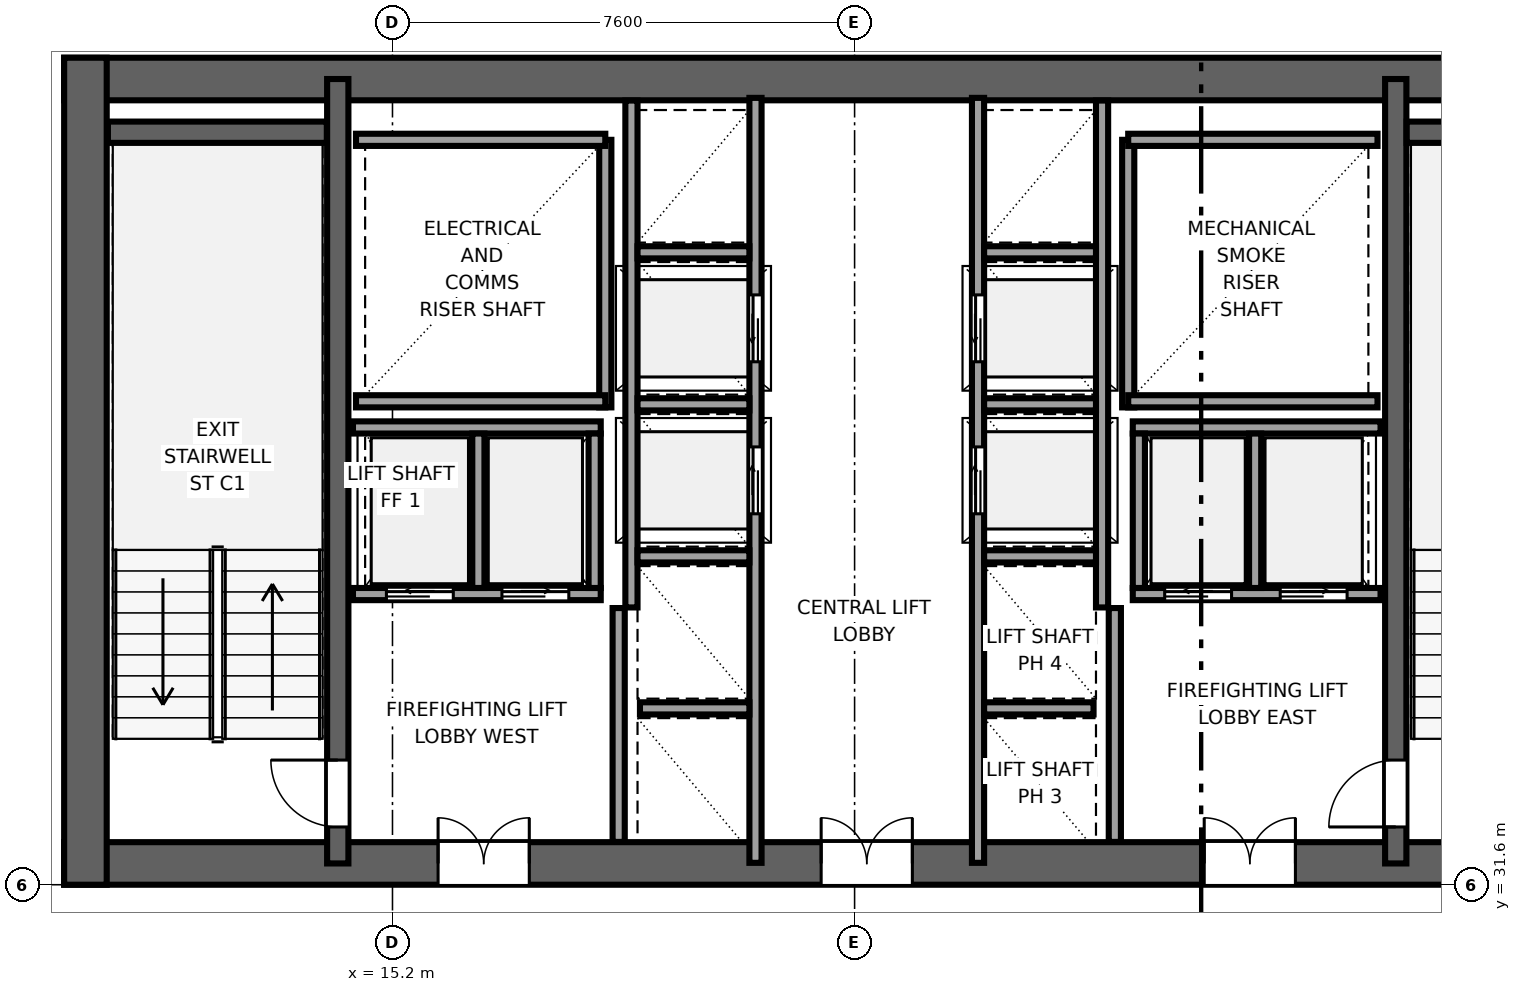
"""IFC4 building model, lengths in metres.
Left out: names, types, materials, properties, quantities, classifications, styles, units other than length and angle.
Written with IfcOpenShell. Run it as: python <this file> out.ifc"""

import sys

from ifc_helpers import new_model, si_unit, direction, frame, frame_2d, origin, place, context, subcontext, project, spatial, rectangle, extrude, source, transform, mapped, element, fill, save


model = new_model("IFC4")
c1 = context("Model", 3, precision=1e-05, world=origin(), true_north=direction((0.0, 1.0)))
c2 = subcontext(c1, "Body", "Model", "MODEL_VIEW")
j1 = project(units=[si_unit("LENGTHUNIT", "METRE"), si_unit("PLANEANGLEUNIT", "RADIAN")], contexts=[c1])
p1 = place(None, origin())
s1 = spatial("IfcSite", under=j1, at=p1, CompositionType="ELEMENT")
p2 = place(p1, origin())
s2 = spatial("IfcBuilding", under=s1, at=p2, CompositionType="ELEMENT")
p3 = place(p2, frame((0.0, 0.0, 118.65)))
s3 = spatial("IfcBuildingStorey", under=s2, at=p3, CompositionType="ELEMENT", Elevation=118.65)
p4 = place(p3, frame((9.8, 31.95, 0.0), z_axis=(0.0, 0.0, 1.0), x_axis=(1.0, 0.0, 0.0)))
e1 = element("IfcWall", 1, at=p4, inside=s3, PredefinedType="SHEAR", context=c2, shape_type="SweptSolid", body=[
    extrude(rectangle(XDim=26.4, YDim=0.7, at=frame_2d((13.2, 0.0))), origin(), (0.0, 0.0, 1.0), 3.55),
])
p5 = place(p4, frame((7.65, 0.0, 0.0), z_axis=(0.0, 0.0, 1.0), x_axis=(-1.0, 0.0, 0.0)))
e2 = element("IfcOpeningElement", 2, at=p5, cuts=e1, PredefinedType="OPENING", context=c2, shape_type="SweptSolid", body=[
    extrude(rectangle(XDim=1.5, YDim=2.04, at=frame_2d((0.75, 1.02))), frame((0.0, 0.36, 0.0), z_axis=(0.0, -1.0, 0.0), x_axis=(1.0, 0.0, 0.0)), (0.0, 0.0, 1.0), 0.72),
])
p6 = place(p4, frame((13.95, 0.0, 0.0), z_axis=(0.0, 0.0, 1.0), x_axis=(-1.0, 0.0, 0.0)))
e3 = element("IfcOpeningElement", 3, at=p6, cuts=e1, PredefinedType="OPENING", context=c2, shape_type="SweptSolid", body=[
    extrude(rectangle(XDim=1.5, YDim=2.04, at=frame_2d((0.75, 1.02))), frame((0.0, 0.36, 0.0), z_axis=(0.0, -1.0, 0.0), x_axis=(1.0, 0.0, 0.0)), (0.0, 0.0, 1.0), 0.72),
])
p7 = place(p4, frame((20.25, 0.0, 0.0), z_axis=(0.0, 0.0, 1.0), x_axis=(-1.0, 0.0, 0.0)))
e4 = element("IfcOpeningElement", 4, at=p7, cuts=e1, PredefinedType="OPENING", context=c2, shape_type="SweptSolid", body=[
    extrude(rectangle(XDim=1.5, YDim=2.04, at=frame_2d((0.75, 1.02))), frame((0.0, 0.36, 0.0), z_axis=(0.0, -1.0, 0.0), x_axis=(1.0, 0.0, 0.0)), (0.0, 0.0, 1.0), 0.72),
])
p8 = place(p3, frame((9.8, 44.85, 0.0), z_axis=(0.0, 0.0, 1.0), x_axis=(1.0, 0.0, 0.0)))
e5 = element("IfcWall", 5, at=p8, inside=s3, PredefinedType="SHEAR", context=c2, shape_type="SweptSolid", body=[
    extrude(rectangle(XDim=26.4, YDim=0.7, at=frame_2d((13.2, 0.0))), origin(), (0.0, 0.0, 1.0), 3.55),
])
p9 = place(p3, frame((10.15, 31.6, 0.0), z_axis=(0.0, 0.0, 1.0), x_axis=(0.0, 1.0, 0.0)))
e6 = element("IfcWall", 6, at=p9, inside=s3, PredefinedType="SHEAR", context=c2, shape_type="SweptSolid", body=[
    extrude(rectangle(XDim=13.6, YDim=0.7, at=frame_2d((6.8, 0.0))), origin(), (0.0, 0.0, 1.0), 3.55),
])
p10 = place(p3, frame((14.3, 31.95, 0.0), z_axis=(0.0, 0.0, 1.0), x_axis=(0.0, 1.0, 0.0)))
e7 = element("IfcWall", 7, at=p10, inside=s3, PredefinedType="SHEAR", context=c2, shape_type="SweptSolid", body=[
    extrude(rectangle(XDim=12.9, YDim=0.35, at=frame_2d((6.45, 0.0))), origin(), (0.0, 0.0, 1.0), 3.55),
])
p11 = place(p10, frame((0.6, 0.0, 0.0)))
e8 = element("IfcOpeningElement", 8, at=p11, cuts=e7, PredefinedType="OPENING", context=c2, shape_type="SweptSolid", body=[
    extrude(rectangle(XDim=1.1, YDim=2.12, at=frame_2d((0.55, 1.06))), frame((0.0, 0.185, 0.0), z_axis=(0.0, -1.0, 0.0), x_axis=(1.0, 0.0, 0.0)), (0.0, 0.0, 1.0), 0.37),
])
p12 = place(p3, frame((31.7, 31.95, 0.0), z_axis=(0.0, 0.0, 1.0), x_axis=(0.0, 1.0, 0.0)))
e9 = element("IfcWall", 9, at=p12, inside=s3, PredefinedType="SHEAR", context=c2, shape_type="SweptSolid", body=[
    extrude(rectangle(XDim=12.9, YDim=0.35, at=frame_2d((6.45, 0.0))), origin(), (0.0, 0.0, 1.0), 3.55),
])
p13 = place(p12, frame((1.7, 0.0, 0.0), z_axis=(0.0, 0.0, 1.0), x_axis=(-1.0, 0.0, 0.0)))
e10 = element("IfcOpeningElement", 10, at=p13, cuts=e9, PredefinedType="OPENING", context=c2, shape_type="SweptSolid", body=[
    extrude(rectangle(XDim=1.1, YDim=2.12, at=frame_2d((0.55, 1.06))), frame((0.0, 0.185, 0.0), z_axis=(0.0, -1.0, 0.0), x_axis=(1.0, 0.0, 0.0)), (0.0, 0.0, 1.0), 0.37),
])
for number, where, z_axis, x_axis in (
    (11, (10.52, 43.975, 0.0), (0.0, 0.0, 1.0), (1.0, 0.0, 0.0)),
    (12, (31.88, 43.975, 0.0), (0.0, 0.0, 1.0), (1.0, 0.0, 0.0)),
):
    element("IfcWall", number, at=place(p3, frame(where, z_axis=z_axis, x_axis=x_axis)), inside=s3, PredefinedType="SHEAR", context=c2, shape_type="SweptSolid", body=[
        extrude(rectangle(XDim=3.6, YDim=0.35, at=frame_2d((1.8, 0.0))), origin(), (0.0, 0.0, 1.0), 3.55),
    ])
p14 = place(p3, frame((18.7, 39.45, 0.0), z_axis=(0.0, 0.0, 1.0), x_axis=(0.0, 1.0, 0.0)))
e13 = element("IfcWall", 13, at=p14, inside=s3, PredefinedType="SOLIDWALL", context=c2, shape_type="SweptSolid", body=[
    extrude(rectangle(XDim=4.4, YDim=0.2, at=frame_2d((2.2, 0.0))), origin(), (0.0, 0.0, 1.0), 3.37),
])
for number, where, z_axis, x_axis in (
    (14, (14.6, 39.55, 0.0), (0.0, 0.0, 1.0), (1.0, 0.0, 0.0)),
    (15, (14.6, 43.85, 0.0), (0.0, 0.0, 1.0), (1.0, 0.0, 0.0)),
):
    element("IfcWall", number, at=place(p3, frame(where, z_axis=z_axis, x_axis=x_axis)), inside=s3, PredefinedType="SOLIDWALL", context=c2, shape_type="SweptSolid", body=[
        extrude(rectangle(XDim=4.1, YDim=0.2, at=frame_2d((2.05, 0.0))), origin(), (0.0, 0.0, 1.0), 3.37),
    ])
p15 = place(p3, frame((27.3, 39.45, 0.0), z_axis=(0.0, 0.0, 1.0), x_axis=(0.0, 1.0, 0.0)))
e16 = element("IfcWall", 16, at=p15, inside=s3, PredefinedType="SOLIDWALL", context=c2, shape_type="SweptSolid", body=[
    extrude(rectangle(XDim=4.4, YDim=0.2, at=frame_2d((2.2, 0.0))), origin(), (0.0, 0.0, 1.0), 3.37),
])
for number, where, z_axis, x_axis in (
    (17, (27.3, 39.55, 0.0), (0.0, 0.0, 1.0), (1.0, 0.0, 0.0)),
    (18, (27.3, 43.85, 0.0), (0.0, 0.0, 1.0), (1.0, 0.0, 0.0)),
):
    element("IfcWall", number, at=place(p3, frame(where, z_axis=z_axis, x_axis=x_axis)), inside=s3, PredefinedType="SOLIDWALL", context=c2, shape_type="SweptSolid", body=[
        extrude(rectangle(XDim=4.1, YDim=0.2, at=frame_2d((2.05, 0.0))), origin(), (0.0, 0.0, 1.0), 3.37),
    ])
for number, where, z_axis, x_axis in (
    (19, (18.92, 32.304, 0.0), (0.0, 0.0, 1.0), (0.0, 1.0, 0.0)),
    (20, (27.08, 32.304, 0.0), (0.0, 0.0, 1.0), (0.0, 1.0, 0.0)),
):
    element("IfcWall", number, at=place(p3, frame(where, z_axis=z_axis, x_axis=x_axis)), inside=s3, PredefinedType="SOLIDWALL", context=c2, shape_type="SweptSolid", body=[
        extrude(rectangle(XDim=3.846, YDim=0.2, at=frame_2d((1.923, 0.0))), origin(), (0.0, 0.0, 1.0), 3.37),
    ])
p16 = place(p3, frame((21.17, 31.96, 0.0), z_axis=(0.0, 0.0, 1.0), x_axis=(0.0, 1.0, 0.0)))
e21 = element("IfcWall", 21, at=p16, inside=s3, PredefinedType="SOLIDWALL", context=c2, shape_type="SweptSolid", body=[
    extrude(rectangle(XDim=12.58, YDim=0.2, at=frame_2d((6.29, 0.0))), origin(), (0.0, 0.0, 1.0), 3.37),
])
p17 = place(p16, frame((5.74, 0.0, 0.0)))
e22 = element("IfcOpeningElement", 22, at=p17, cuts=e21, PredefinedType="OPENING", context=c2, shape_type="SweptSolid", body=[
    extrude(rectangle(XDim=1.1, YDim=2.12, at=frame_2d((0.55, 1.06))), frame((0.0, 0.11, 0.0), z_axis=(0.0, -1.0, 0.0), x_axis=(1.0, 0.0, 0.0)), (0.0, 0.0, 1.0), 0.22),
])
p18 = place(p16, frame((8.24, 0.0, 0.0)))
e23 = element("IfcOpeningElement", 23, at=p18, cuts=e21, PredefinedType="OPENING", context=c2, shape_type="SweptSolid", body=[
    extrude(rectangle(XDim=1.1, YDim=2.12, at=frame_2d((0.55, 1.06))), frame((0.0, 0.11, 0.0), z_axis=(0.0, -1.0, 0.0), x_axis=(1.0, 0.0, 0.0)), (0.0, 0.0, 1.0), 0.22),
])
p19 = place(p3, frame((19.13, 36.16, 0.0), z_axis=(0.0, 0.0, 1.0), x_axis=(0.0, 1.0, 0.0)))
e24 = element("IfcWall", 24, at=p19, inside=s3, PredefinedType="SOLIDWALL", context=c2, shape_type="SweptSolid", body=[
    extrude(rectangle(XDim=8.336, YDim=0.2, at=frame_2d((4.168, 0.0))), origin(), (0.0, 0.0, 1.0), 3.37),
])
p20 = place(p3, frame((19.27, 34.5, 0.0), z_axis=(0.0, 0.0, 1.0), x_axis=(1.0, 0.0, 0.0)))
e25 = element("IfcWall", 25, at=p20, inside=s3, PredefinedType="SOLIDWALL", context=c2, shape_type="SweptSolid", body=[
    extrude(rectangle(XDim=1.8, YDim=0.2, at=frame_2d((0.9, 0.0))), origin(), (0.0, 0.0, 1.0), 3.37),
])
for number, where, z_axis, x_axis in (
    (26, (19.23, 37.0, 0.0), (0.0, 0.0, 1.0), (1.0, 0.0, 0.0)),
    (27, (19.23, 39.5, 0.0), (0.0, 0.0, 1.0), (1.0, 0.0, 0.0)),
    (28, (19.23, 42.0, 0.0), (0.0, 0.0, 1.0), (1.0, 0.0, 0.0)),
):
    element("IfcWall", number, at=place(p3, frame(where, z_axis=z_axis, x_axis=x_axis)), inside=s3, PredefinedType="SOLIDWALL", context=c2, shape_type="SweptSolid", body=[
        extrude(rectangle(XDim=1.84, YDim=0.2, at=frame_2d((0.92, 0.0))), origin(), (0.0, 0.0, 1.0), 3.37),
    ])
p21 = place(p3, frame((27.375, 36.38, 0.0), z_axis=(0.0, 0.0, 1.0), x_axis=(1.0, 0.0, 0.0)))
e29 = element("IfcWall", 29, at=p21, inside=s3, PredefinedType="SOLIDWALL", context=c2, shape_type="SweptSolid", body=[
    extrude(rectangle(XDim=4.075, YDim=0.2, at=frame_2d((2.038, 0.0))), origin(), (0.0, 0.0, 1.0), 3.37),
])
p22 = place(p21, frame((0.525, 0.0, 0.0)))
e30 = element("IfcOpeningElement", 30, at=p22, cuts=e29, PredefinedType="OPENING", context=c2, shape_type="SweptSolid", body=[
    extrude(rectangle(XDim=1.1, YDim=2.12, at=frame_2d((0.55, 1.06))), frame((0.0, 0.11, 0.0), z_axis=(0.0, -1.0, 0.0), x_axis=(1.0, 0.0, 0.0)), (0.0, 0.0, 1.0), 0.22),
])
p23 = place(p21, frame((2.425, 0.0, 0.0)))
e31 = element("IfcOpeningElement", 31, at=p23, cuts=e29, PredefinedType="OPENING", context=c2, shape_type="SweptSolid", body=[
    extrude(rectangle(XDim=1.1, YDim=2.12, at=frame_2d((0.55, 1.06))), frame((0.0, 0.11, 0.0), z_axis=(0.0, -1.0, 0.0), x_axis=(1.0, 0.0, 0.0)), (0.0, 0.0, 1.0), 0.22),
])
p24 = place(p3, frame((27.375, 39.12, 0.0), z_axis=(0.0, 0.0, 1.0), x_axis=(1.0, 0.0, 0.0)))
e32 = element("IfcWall", 32, at=p24, inside=s3, PredefinedType="SOLIDWALL", context=c2, shape_type="SweptSolid", body=[
    extrude(rectangle(XDim=4.075, YDim=0.2, at=frame_2d((2.038, 0.0))), origin(), (0.0, 0.0, 1.0), 3.37),
])
for number, where, z_axis, x_axis in (
    (33, (27.475, 36.48, 0.0), (0.0, 0.0, 1.0), (0.0, 1.0, 0.0)),
    (34, (29.387, 36.48, 0.0), (0.0, 0.0, 1.0), (0.0, 1.0, 0.0)),
):
    element("IfcWall", number, at=place(p3, frame(where, z_axis=z_axis, x_axis=x_axis)), inside=s3, PredefinedType="SOLIDWALL", context=c2, shape_type="SweptSolid", body=[
        extrude(rectangle(XDim=2.54, YDim=0.2, at=frame_2d((1.27, 0.0))), origin(), (0.0, 0.0, 1.0), 3.37),
    ])
p25 = place(p3, frame((14.55, 36.38, 0.0), z_axis=(0.0, 0.0, 1.0), x_axis=(1.0, 0.0, 0.0)))
e35 = element("IfcWall", 35, at=p25, inside=s3, PredefinedType="SOLIDWALL", context=c2, shape_type="SweptSolid", body=[
    extrude(rectangle(XDim=4.075, YDim=0.2, at=frame_2d((2.038, 0.0))), origin(), (0.0, 0.0, 1.0), 3.37),
])
p26 = place(p25, frame((0.55, 0.0, 0.0)))
e36 = element("IfcOpeningElement", 36, at=p26, cuts=e35, PredefinedType="OPENING", context=c2, shape_type="SweptSolid", body=[
    extrude(rectangle(XDim=1.1, YDim=2.12, at=frame_2d((0.55, 1.06))), frame((0.0, 0.11, 0.0), z_axis=(0.0, -1.0, 0.0), x_axis=(1.0, 0.0, 0.0)), (0.0, 0.0, 1.0), 0.22),
])
p27 = place(p25, frame((2.45, 0.0, 0.0)))
e37 = element("IfcOpeningElement", 37, at=p27, cuts=e35, PredefinedType="OPENING", context=c2, shape_type="SweptSolid", body=[
    extrude(rectangle(XDim=1.1, YDim=2.12, at=frame_2d((0.55, 1.06))), frame((0.0, 0.11, 0.0), z_axis=(0.0, -1.0, 0.0), x_axis=(1.0, 0.0, 0.0)), (0.0, 0.0, 1.0), 0.22),
])
p28 = place(p3, frame((14.55, 39.12, 0.0), z_axis=(0.0, 0.0, 1.0), x_axis=(1.0, 0.0, 0.0)))
e38 = element("IfcWall", 38, at=p28, inside=s3, PredefinedType="SOLIDWALL", context=c2, shape_type="SweptSolid", body=[
    extrude(rectangle(XDim=4.075, YDim=0.2, at=frame_2d((2.038, 0.0))), origin(), (0.0, 0.0, 1.0), 3.37),
])
for number, where, z_axis, x_axis in (
    (39, (18.525, 36.48, 0.0), (0.0, 0.0, 1.0), (0.0, 1.0, 0.0)),
    (40, (16.613, 36.48, 0.0), (0.0, 0.0, 1.0), (0.0, 1.0, 0.0)),
):
    element("IfcWall", number, at=place(p3, frame(where, z_axis=z_axis, x_axis=x_axis)), inside=s3, PredefinedType="SOLIDWALL", context=c2, shape_type="SweptSolid", body=[
        extrude(rectangle(XDim=2.54, YDim=0.2, at=frame_2d((1.27, 0.0))), origin(), (0.0, 0.0, 1.0), 3.37),
    ])
p29 = place(p3, frame((24.83, 31.96, 0.0), z_axis=(0.0, 0.0, 1.0), x_axis=(0.0, 1.0, 0.0)))
e41 = element("IfcWall", 41, at=p29, inside=s3, PredefinedType="SOLIDWALL", context=c2, shape_type="SweptSolid", body=[
    extrude(rectangle(XDim=12.58, YDim=0.2, at=frame_2d((6.29, 0.0))), origin(), (0.0, 0.0, 1.0), 3.37),
])
p30 = place(p29, frame((5.74, 0.0, 0.0)))
e42 = element("IfcOpeningElement", 42, at=p30, cuts=e41, PredefinedType="OPENING", context=c2, shape_type="SweptSolid", body=[
    extrude(rectangle(XDim=1.1, YDim=2.12, at=frame_2d((0.55, 1.06))), frame((0.0, 0.11, 0.0), z_axis=(0.0, -1.0, 0.0), x_axis=(1.0, 0.0, 0.0)), (0.0, 0.0, 1.0), 0.22),
])
p31 = place(p29, frame((8.24, 0.0, 0.0)))
e43 = element("IfcOpeningElement", 43, at=p31, cuts=e41, PredefinedType="OPENING", context=c2, shape_type="SweptSolid", body=[
    extrude(rectangle(XDim=1.1, YDim=2.12, at=frame_2d((0.55, 1.06))), frame((0.0, 0.11, 0.0), z_axis=(0.0, -1.0, 0.0), x_axis=(1.0, 0.0, 0.0)), (0.0, 0.0, 1.0), 0.22),
])
p32 = place(p3, frame((26.87, 36.16, 0.0), z_axis=(0.0, 0.0, 1.0), x_axis=(0.0, 1.0, 0.0)))
e44 = element("IfcWall", 44, at=p32, inside=s3, PredefinedType="SOLIDWALL", context=c2, shape_type="SweptSolid", body=[
    extrude(rectangle(XDim=8.336, YDim=0.2, at=frame_2d((4.168, 0.0))), origin(), (0.0, 0.0, 1.0), 3.37),
])
p33 = place(p3, frame((24.93, 34.5, 0.0), z_axis=(0.0, 0.0, 1.0), x_axis=(1.0, 0.0, 0.0)))
e45 = element("IfcWall", 45, at=p33, inside=s3, PredefinedType="SOLIDWALL", context=c2, shape_type="SweptSolid", body=[
    extrude(rectangle(XDim=1.8, YDim=0.2, at=frame_2d((0.9, 0.0))), origin(), (0.0, 0.0, 1.0), 3.37),
])
for number, where, z_axis, x_axis in (
    (46, (24.93, 37.0, 0.0), (0.0, 0.0, 1.0), (1.0, 0.0, 0.0)),
    (47, (24.93, 39.5, 0.0), (0.0, 0.0, 1.0), (1.0, 0.0, 0.0)),
    (48, (24.93, 42.0, 0.0), (0.0, 0.0, 1.0), (1.0, 0.0, 0.0)),
):
    element("IfcWall", number, at=place(p3, frame(where, z_axis=z_axis, x_axis=x_axis)), inside=s3, PredefinedType="SOLIDWALL", context=c2, shape_type="SweptSolid", body=[
        extrude(rectangle(XDim=1.84, YDim=0.2, at=frame_2d((0.92, 0.0))), origin(), (0.0, 0.0, 1.0), 3.37),
    ])
m1 = source(origin(), c2, "Body", "SweptSolid", [
    extrude(rectangle(XDim=1.1, YDim=2.12, at=frame_2d((0.55, 1.06))), frame((0.0, 0.025, 0.0), z_axis=(0.0, -1.0, 0.0), x_axis=(1.0, 0.0, 0.0)), (0.0, 0.0, 1.0), 0.05),
])
p34 = place(p11, origin())
e49 = element("IfcDoor", 49, at=p34, inside=s3, OperationType="SINGLE_SWING_RIGHT", PredefinedType="DOOR", context=c2, shape_type="MappedRepresentation", body=[
    mapped(m1, transform((0.0, 0.0, 0.0), x_axis=(1.0, 0.0, 0.0), y_axis=(0.0, 1.0, 0.0), z_axis=(0.0, 0.0, 1.0), scale=1.0)),
])
fill(e8, e49)
p35 = place(p13, origin())
e50 = element("IfcDoor", 50, at=p35, inside=s3, OperationType="SINGLE_SWING_LEFT", PredefinedType="DOOR", context=c2, shape_type="MappedRepresentation", body=[
    mapped(m1, transform((0.0, 0.0, 0.0), x_axis=(1.0, 0.0, 0.0), y_axis=(0.0, 1.0, 0.0), z_axis=(0.0, 0.0, 1.0), scale=1.0)),
])
fill(e10, e50)
m2 = source(origin(), c2, "Body", "SweptSolid", [
    extrude(rectangle(XDim=1.5, YDim=2.04, at=frame_2d((0.75, 1.02))), frame((0.0, 0.025, 0.0), z_axis=(0.0, -1.0, 0.0), x_axis=(1.0, 0.0, 0.0)), (0.0, 0.0, 1.0), 0.05),
])
p36 = place(p5, origin())
e51 = element("IfcDoor", 51, at=p36, inside=s3, OperationType="DOUBLE_DOOR_SINGLE_SWING", PredefinedType="DOOR", context=c2, shape_type="MappedRepresentation", body=[
    mapped(m2, transform((0.0, 0.0, 0.0), x_axis=(1.0, 0.0, 0.0), y_axis=(0.0, 1.0, 0.0), z_axis=(0.0, 0.0, 1.0), scale=1.0)),
])
fill(e2, e51)
p37 = place(p6, origin())
e52 = element("IfcDoor", 52, at=p37, inside=s3, OperationType="DOUBLE_DOOR_SINGLE_SWING", PredefinedType="DOOR", context=c2, shape_type="MappedRepresentation", body=[
    mapped(m2, transform((0.0, 0.0, 0.0), x_axis=(1.0, 0.0, 0.0), y_axis=(0.0, 1.0, 0.0), z_axis=(0.0, 0.0, 1.0), scale=1.0)),
])
fill(e3, e52)
p38 = place(p7, origin())
e53 = element("IfcDoor", 53, at=p38, inside=s3, OperationType="DOUBLE_DOOR_SINGLE_SWING", PredefinedType="DOOR", context=c2, shape_type="MappedRepresentation", body=[
    mapped(m2, transform((0.0, 0.0, 0.0), x_axis=(1.0, 0.0, 0.0), y_axis=(0.0, 1.0, 0.0), z_axis=(0.0, 0.0, 1.0), scale=1.0)),
])
fill(e4, e53)
m3 = source(origin(), c2, "Body", "SweptSolid", [
    extrude(rectangle(XDim=1.1, YDim=2.12, at=frame_2d((0.55, 1.06))), frame((0.0, 0.025, 0.0), z_axis=(0.0, -1.0, 0.0), x_axis=(1.0, 0.0, 0.0)), (0.0, 0.0, 1.0), 0.05),
])
p39 = place(p17, origin())
e54 = element("IfcDoor", 54, at=p39, inside=s3, OperationType="SLIDING_TO_RIGHT", PredefinedType="DOOR", context=c2, shape_type="MappedRepresentation", body=[
    mapped(m3, transform((0.0, 0.0, 0.0), x_axis=(1.0, 0.0, 0.0), y_axis=(0.0, 1.0, 0.0), z_axis=(0.0, 0.0, 1.0), scale=1.0)),
])
fill(e22, e54)
p40 = place(p18, origin())
e55 = element("IfcDoor", 55, at=p40, inside=s3, OperationType="SLIDING_TO_LEFT", PredefinedType="DOOR", context=c2, shape_type="MappedRepresentation", body=[
    mapped(m3, transform((0.0, 0.0, 0.0), x_axis=(1.0, 0.0, 0.0), y_axis=(0.0, 1.0, 0.0), z_axis=(0.0, 0.0, 1.0), scale=1.0)),
])
fill(e23, e55)
p41 = place(p22, origin())
e56 = element("IfcDoor", 56, at=p41, inside=s3, OperationType="SLIDING_TO_LEFT", PredefinedType="DOOR", context=c2, shape_type="MappedRepresentation", body=[
    mapped(m3, transform((0.0, 0.0, 0.0), x_axis=(1.0, 0.0, 0.0), y_axis=(0.0, 1.0, 0.0), z_axis=(0.0, 0.0, 1.0), scale=1.0)),
])
fill(e30, e56)
p42 = place(p23, origin())
e57 = element("IfcDoor", 57, at=p42, inside=s3, OperationType="SLIDING_TO_RIGHT", PredefinedType="DOOR", context=c2, shape_type="MappedRepresentation", body=[
    mapped(m3, transform((0.0, 0.0, 0.0), x_axis=(1.0, 0.0, 0.0), y_axis=(0.0, 1.0, 0.0), z_axis=(0.0, 0.0, 1.0), scale=1.0)),
])
fill(e31, e57)
p43 = place(p26, origin())
e58 = element("IfcDoor", 58, at=p43, inside=s3, OperationType="SLIDING_TO_LEFT", PredefinedType="DOOR", context=c2, shape_type="MappedRepresentation", body=[
    mapped(m3, transform((0.0, 0.0, 0.0), x_axis=(1.0, 0.0, 0.0), y_axis=(0.0, 1.0, 0.0), z_axis=(0.0, 0.0, 1.0), scale=1.0)),
])
fill(e36, e58)
p44 = place(p27, origin())
e59 = element("IfcDoor", 59, at=p44, inside=s3, OperationType="SLIDING_TO_RIGHT", PredefinedType="DOOR", context=c2, shape_type="MappedRepresentation", body=[
    mapped(m3, transform((0.0, 0.0, 0.0), x_axis=(1.0, 0.0, 0.0), y_axis=(0.0, 1.0, 0.0), z_axis=(0.0, 0.0, 1.0), scale=1.0)),
])
fill(e37, e59)
p45 = place(p30, origin())
e60 = element("IfcDoor", 60, at=p45, inside=s3, OperationType="SLIDING_TO_RIGHT", PredefinedType="DOOR", context=c2, shape_type="MappedRepresentation", body=[
    mapped(m3, transform((0.0, 0.0, 0.0), x_axis=(1.0, 0.0, 0.0), y_axis=(0.0, 1.0, 0.0), z_axis=(0.0, 0.0, 1.0), scale=1.0)),
])
fill(e42, e60)
p46 = place(p31, origin())
e61 = element("IfcDoor", 61, at=p46, inside=s3, OperationType="SLIDING_TO_LEFT", PredefinedType="DOOR", context=c2, shape_type="MappedRepresentation", body=[
    mapped(m3, transform((0.0, 0.0, 0.0), x_axis=(1.0, 0.0, 0.0), y_axis=(0.0, 1.0, 0.0), z_axis=(0.0, 0.0, 1.0), scale=1.0)),
])
fill(e43, e61)
save(model, sys.argv[1])
